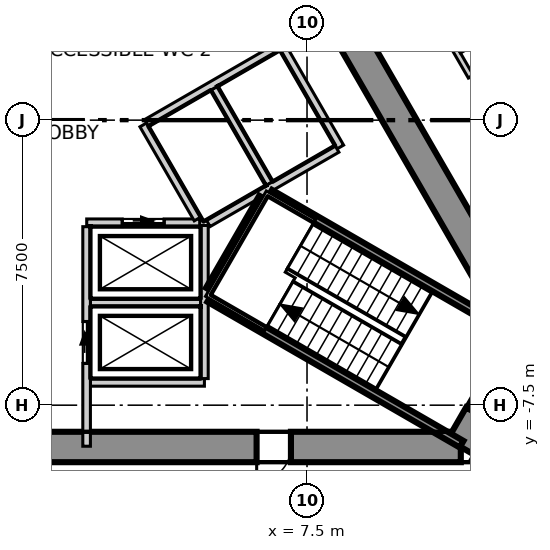
"""IFC4 building model, lengths in metres.
Left out: names, types, materials, properties, quantities, classifications, styles, units other than length and angle.
Written with IfcOpenShell. Run it as: python <this file> out.ifc"""

import sys

from ifc_helpers import new_model, si_unit, direction, frame, frame_2d, origin, place, context, subcontext, project, spatial, polyline, rectangle, outline, extrude, element, fill, save


model = new_model("IFC4")
c1 = context("Model", 3, precision=1e-05, world=origin(), true_north=direction((0.0, 1.0)))
c2 = subcontext(c1, "Body", "Model", "MODEL_VIEW")
j1 = project(units=[si_unit("LENGTHUNIT", "METRE"), si_unit("PLANEANGLEUNIT", "RADIAN")], contexts=[c1])
p1 = place(None, origin())
s1 = spatial("IfcSite", under=j1, at=p1, CompositionType="ELEMENT")
p2 = place(p1, origin())
s2 = spatial("IfcBuilding", under=s1, at=p2, CompositionType="ELEMENT")
p3 = place(p2, frame((0.0, 0.0, 164.3)))
s3 = spatial("IfcBuildingStorey", under=s2, at=p3, CompositionType="ELEMENT", Elevation=164.3)
p4 = place(p3, frame((-11.547, -8.6, -0.3), z_axis=(0.0, 0.0, 1.0), x_axis=(1.0, 0.0, 0.0)))
e1 = element("IfcWall", 1, at=p4, inside=s3, PredefinedType="SHEAR", context=c2, shape_type="SweptSolid", body=[
    extrude(outline(polyline([(-0.231, -0.4), (1.732, -0.4), (3.695, -0.4), (5.658, -0.4), (7.621, -0.4), (9.584, -0.4), (11.547, -0.4), (13.51, -0.4), (15.473, -0.4), (17.436, -0.4), (19.399, -0.4), (21.362, -0.4), (23.325, -0.4), (22.863, 0.4), (20.977, 0.4), (19.091, 0.4), (17.205, 0.4), (15.319, 0.4), (13.433, 0.4), (11.547, 0.4), (9.661, 0.4), (7.775, 0.4), (5.889, 0.4), (4.003, 0.4), (2.117, 0.4), (0.231, 0.4), (-0.231, -0.4)])), origin(), (0.0, 0.0, 1.0), 4.0),
])
p5 = place(p4, frame((3.34, 0.0, 0.3)))
e2 = element("IfcOpeningElement", 2, at=p5, cuts=e1, PredefinedType="OPENING", context=c2, shape_type="SweptSolid", body=[
    extrude(rectangle(XDim=0.9, YDim=2.1, at=frame_2d((0.45, 1.05))), frame((0.0, 0.41, 0.0), z_axis=(0.0, -1.0, 0.0), x_axis=(1.0, 0.0, 0.0)), (0.0, 0.0, 1.0), 0.82),
])
p6 = place(p4, frame((17.722, 0.0, 0.3)))
e3 = element("IfcOpeningElement", 3, at=p6, cuts=e1, PredefinedType="OPENING", context=c2, shape_type="SweptSolid", body=[
    extrude(rectangle(XDim=0.9, YDim=2.1, at=frame_2d((0.45, 1.05))), frame((0.0, 0.41, 0.0), z_axis=(0.0, -1.0, 0.0), x_axis=(1.0, 0.0, 0.0)), (0.0, 0.0, 1.0), 0.82),
])
p7 = place(p3, frame((11.547, -8.6, -0.3), z_axis=(0.0, 0.0, 1.0), x_axis=(0.49987182685, 0.866099391942, 0.0)))
e4 = element("IfcWall", 4, at=p7, inside=s3, PredefinedType="SHEAR", context=c2, shape_type="SweptSolid", body=[
    extrude(outline(polyline([(-0.231, -0.4), (1.674, -0.4), (3.579, -0.4), (3.118, 0.4), (1.674, 0.4), (0.231, 0.4), (-0.231, -0.4)])), origin(), (0.0, 0.0, 1.0), 4.0),
])
p8 = place(p7, frame((0.974, 0.0, 0.3)))
e5 = element("IfcOpeningElement", 5, at=p8, cuts=e4, PredefinedType="OPENING", context=c2, shape_type="SweptSolid", body=[
    extrude(rectangle(XDim=1.4, YDim=2.1, at=frame_2d((0.7, 1.05))), frame((0.0, 0.41, 0.0), z_axis=(0.0, -1.0, 0.0), x_axis=(1.0, 0.0, 0.0)), (0.0, 0.0, 1.0), 0.82),
])
p9 = place(p3, frame((13.221, -5.7, -0.3), z_axis=(0.0, 0.0, 1.0), x_axis=(-0.499995765644, 0.866027848477, 0.0)))
e6 = element("IfcWall", 6, at=p9, inside=s3, PredefinedType="SHEAR", context=c2, shape_type="SweptSolid", body=[
    extrude(outline(polyline([(-0.231, -0.4), (1.732, -0.4), (3.695, -0.4), (5.658, -0.4), (7.621, -0.4), (9.584, -0.4), (11.547, -0.4), (13.51, -0.4), (15.473, -0.4), (17.436, -0.4), (19.399, -0.4), (21.362, -0.4), (23.325, -0.4), (22.863, 0.4), (20.977, 0.4), (19.091, 0.4), (17.205, 0.4), (15.319, 0.4), (13.433, 0.4), (11.547, 0.4), (9.661, 0.4), (7.775, 0.4), (5.889, 0.4), (4.003, 0.4), (2.117, 0.4), (0.231, 0.4), (-0.231, -0.4)])), origin(), (0.0, 0.0, 1.0), 4.0),
])
p10 = place(p9, frame((10.647, 0.0, 0.3)))
e7 = element("IfcOpeningElement", 7, at=p10, cuts=e6, PredefinedType="OPENING", context=c2, shape_type="SweptSolid", body=[
    extrude(rectangle(XDim=1.8, YDim=2.1, at=frame_2d((0.9, 1.05))), frame((0.0, 0.41, 0.0), z_axis=(0.0, -1.0, 0.0), x_axis=(1.0, 0.0, 0.0)), (0.0, 0.0, 1.0), 0.82),
])
p11 = place(p9, frame((17.671, 0.0, 0.3)))
e8 = element("IfcOpeningElement", 8, at=p11, cuts=e6, PredefinedType="OPENING", context=c2, shape_type="SweptSolid", body=[
    extrude(rectangle(XDim=1.0, YDim=2.1, at=frame_2d((0.5, 1.05))), frame((0.0, 0.41, 0.0), z_axis=(0.0, -1.0, 0.0), x_axis=(1.0, 0.0, 0.0)), (0.0, 0.0, 1.0), 0.82),
])
p12 = place(p3, frame((30.204, -14.006, 0.0), z_axis=(0.0, 0.0, 1.0), x_axis=(-0.500008017777, 0.866020774669, 0.0)))
e9 = element("IfcWall", 9, at=p12, inside=s3, PredefinedType="ELEMENTEDWALL", context=c2, shape_type="SweptSolid", body=[
    extrude(rectangle(XDim=54.443, YDim=0.2, at=frame_2d((27.222, 0.0))), origin(), (0.0, 0.0, 1.0), 3.7),
])
p13 = place(p12, frame((2.094, 0.0, 0.9)))
e10 = element("IfcOpeningElement", 10, at=p13, cuts=e9, PredefinedType="OPENING", context=c2, shape_type="SweptSolid", body=[
    extrude(rectangle(XDim=4.9, YDim=2.5, at=frame_2d((2.45, 1.25))), frame((0.0, 0.11, 0.0), z_axis=(0.0, -1.0, 0.0), x_axis=(1.0, 0.0, 0.0)), (0.0, 0.0, 1.0), 0.22),
])
p14 = place(p12, frame((8.576, 0.0, 0.9)))
e11 = element("IfcOpeningElement", 11, at=p14, cuts=e9, PredefinedType="OPENING", context=c2, shape_type="SweptSolid", body=[
    extrude(rectangle(XDim=4.9, YDim=2.5, at=frame_2d((2.45, 1.25))), frame((0.0, 0.11, 0.0), z_axis=(0.0, -1.0, 0.0), x_axis=(1.0, 0.0, 0.0)), (0.0, 0.0, 1.0), 0.22),
])
p15 = place(p12, frame((15.058, 0.0, 0.9)))
e12 = element("IfcOpeningElement", 12, at=p15, cuts=e9, PredefinedType="OPENING", context=c2, shape_type="SweptSolid", body=[
    extrude(rectangle(XDim=4.9, YDim=2.5, at=frame_2d((2.45, 1.25))), frame((0.0, 0.11, 0.0), z_axis=(0.0, -1.0, 0.0), x_axis=(1.0, 0.0, 0.0)), (0.0, 0.0, 1.0), 0.22),
])
p16 = place(p12, frame((21.54, 0.0, 0.9)))
e13 = element("IfcOpeningElement", 13, at=p16, cuts=e9, PredefinedType="OPENING", context=c2, shape_type="SweptSolid", body=[
    extrude(rectangle(XDim=4.9, YDim=2.5, at=frame_2d((2.45, 1.25))), frame((0.0, 0.11, 0.0), z_axis=(0.0, -1.0, 0.0), x_axis=(1.0, 0.0, 0.0)), (0.0, 0.0, 1.0), 0.22),
])
p17 = place(p12, frame((28.023, 0.0, 0.9)))
e14 = element("IfcOpeningElement", 14, at=p17, cuts=e9, PredefinedType="OPENING", context=c2, shape_type="SweptSolid", body=[
    extrude(rectangle(XDim=4.9, YDim=2.5, at=frame_2d((2.45, 1.25))), frame((0.0, 0.11, 0.0), z_axis=(0.0, -1.0, 0.0), x_axis=(1.0, 0.0, 0.0)), (0.0, 0.0, 1.0), 0.22),
])
p18 = place(p12, frame((34.505, 0.0, 0.9)))
e15 = element("IfcOpeningElement", 15, at=p18, cuts=e9, PredefinedType="OPENING", context=c2, shape_type="SweptSolid", body=[
    extrude(rectangle(XDim=4.9, YDim=2.5, at=frame_2d((2.45, 1.25))), frame((0.0, 0.11, 0.0), z_axis=(0.0, -1.0, 0.0), x_axis=(1.0, 0.0, 0.0)), (0.0, 0.0, 1.0), 0.22),
])
p19 = place(p12, frame((40.987, 0.0, 0.9)))
e16 = element("IfcOpeningElement", 16, at=p19, cuts=e9, PredefinedType="OPENING", context=c2, shape_type="SweptSolid", body=[
    extrude(rectangle(XDim=4.9, YDim=2.5, at=frame_2d((2.45, 1.25))), frame((0.0, 0.11, 0.0), z_axis=(0.0, -1.0, 0.0), x_axis=(1.0, 0.0, 0.0)), (0.0, 0.0, 1.0), 0.22),
])
p20 = place(p12, frame((47.469, 0.0, 0.9)))
e17 = element("IfcOpeningElement", 17, at=p20, cuts=e9, PredefinedType="OPENING", context=c2, shape_type="SweptSolid", body=[
    extrude(rectangle(XDim=4.9, YDim=2.5, at=frame_2d((2.45, 1.25))), frame((0.0, 0.11, 0.0), z_axis=(0.0, -1.0, 0.0), x_axis=(1.0, 0.0, 0.0)), (0.0, 0.0, 1.0), 0.22),
])
p21 = place(p3, frame((9.804, 4.62, 0.0), z_axis=(0.0, 0.0, 1.0), x_axis=(0.500000173646, -0.86602530353, 0.0)))
e18 = element("IfcWall", 18, at=p21, inside=s3, PredefinedType="PARTITIONING", context=c2, shape_type="SweptSolid", body=[
    extrude(rectangle(XDim=17.654, YDim=0.15, at=frame_2d((8.827, 0.0))), origin(), (0.0, 0.0, 1.0), 3.7),
])
p22 = place(p21, frame((14.354, 0.0, 0.0)))
e19 = element("IfcOpeningElement", 19, at=p22, cuts=e18, PredefinedType="OPENING", context=c2, shape_type="SweptSolid", body=[
    extrude(rectangle(XDim=1.1, YDim=2.1, at=frame_2d((0.55, 1.05))), frame((0.0, 0.085, 0.0), z_axis=(0.0, -1.0, 0.0), x_axis=(1.0, 0.0, 0.0)), (0.0, 0.0, 1.0), 0.17),
])
p23 = place(p21, frame((10.014, 0.0, 0.0)))
e20 = element("IfcOpeningElement", 20, at=p23, cuts=e18, PredefinedType="OPENING", context=c2, shape_type="SweptSolid", body=[
    extrude(rectangle(XDim=0.9, YDim=2.1, at=frame_2d((0.45, 1.05))), frame((0.0, 0.085, 0.0), z_axis=(0.0, -1.0, 0.0), x_axis=(1.0, 0.0, 0.0)), (0.0, 0.0, 1.0), 0.17),
])
p24 = place(p21, frame((6.814, 0.0, 0.0)))
e21 = element("IfcOpeningElement", 21, at=p24, cuts=e18, PredefinedType="OPENING", context=c2, shape_type="SweptSolid", body=[
    extrude(rectangle(XDim=0.9, YDim=2.1, at=frame_2d((0.45, 1.05))), frame((0.0, 0.085, 0.0), z_axis=(0.0, -1.0, 0.0), x_axis=(1.0, 0.0, 0.0)), (0.0, 0.0, 1.0), 0.17),
])
p25 = place(p21, frame((4.014, 0.0, 0.0)))
e22 = element("IfcOpeningElement", 22, at=p25, cuts=e18, PredefinedType="OPENING", context=c2, shape_type="SweptSolid", body=[
    extrude(rectangle(XDim=1.0, YDim=2.1, at=frame_2d((0.5, 1.05))), frame((0.0, 0.085, 0.0), z_axis=(0.0, -1.0, 0.0), x_axis=(1.0, 0.0, 0.0)), (0.0, 0.0, 1.0), 0.17),
])
p26 = place(p3, frame((11.5, 1.831, 0.0), z_axis=(0.0, 0.0, 1.0), x_axis=(0.866061862632, 0.499936846106, 0.0)))
e23 = element("IfcWall", 23, at=p26, inside=s3, PredefinedType="PARTITIONING", context=c2, shape_type="SweptSolid", body=[
    extrude(rectangle(XDim=3.45, YDim=0.15, at=frame_2d((1.725, 0.0))), origin(), (0.0, 0.0, 1.0), 3.7),
])
p27 = place(p3, frame((1.8, -6.9, 0.0), z_axis=(0.0, 0.0, 1.0), x_axis=(1.0, 0.0, 0.0)))
e24 = element("IfcWall", 24, at=p27, inside=s3, PredefinedType="SOLIDWALL", context=c2, shape_type="SweptSolid", body=[
    extrude(rectangle(XDim=3.0, YDim=0.2, at=frame_2d((1.5, 0.0))), origin(), (0.0, 0.0, 1.0), 3.7),
])
p28 = place(p3, frame((1.8, -4.8, 0.0), z_axis=(0.0, 0.0, 1.0), x_axis=(1.0, 0.0, 0.0)))
e25 = element("IfcWall", 25, at=p28, inside=s3, PredefinedType="SOLIDWALL", context=c2, shape_type="SweptSolid", body=[
    extrude(rectangle(XDim=2.9, YDim=0.2, at=frame_2d((1.45, 0.0))), origin(), (0.0, 0.0, 1.0), 3.7),
])
p29 = place(p3, frame((1.703, -2.7, 0.0), z_axis=(0.0, 0.0, 1.0), x_axis=(1.0, 0.0, 0.0)))
e26 = element("IfcWall", 26, at=p29, inside=s3, PredefinedType="SOLIDWALL", context=c2, shape_type="SweptSolid", body=[
    extrude(rectangle(XDim=2.973, YDim=0.2, at=frame_2d((1.487, 0.0))), origin(), (0.0, 0.0, 1.0), 3.7),
])
p30 = place(p29, frame((0.936, 0.0, 0.0)))
e27 = element("IfcOpeningElement", 27, at=p30, cuts=e26, PredefinedType="OPENING", context=c2, shape_type="SweptSolid", body=[
    extrude(rectangle(XDim=1.1, YDim=2.1, at=frame_2d((0.55, 1.05))), frame((0.0, 0.11, 0.0), z_axis=(0.0, -1.0, 0.0), x_axis=(1.0, 0.0, 0.0)), (0.0, 0.0, 1.0), 0.22),
])
p31 = place(p3, frame((3.19, -0.125, 0.0), z_axis=(0.0, 0.0, 1.0), x_axis=(0.499988658015, -0.866031951983, 0.0)))
e28 = element("IfcWall", 28, at=p31, inside=s3, PredefinedType="SOLIDWALL", context=c2, shape_type="SweptSolid", body=[
    extrude(rectangle(XDim=2.858, YDim=0.2, at=frame_2d((1.429, 0.0))), origin(), (0.0, 0.0, 1.0), 3.7),
])
p32 = place(p3, frame((1.7, -8.58, 0.0), z_axis=(0.0, 0.0, 1.0), x_axis=(0.0, 1.0, 0.0)))
e29 = element("IfcWall", 29, at=p32, inside=s3, PredefinedType="SOLIDWALL", context=c2, shape_type="SweptSolid", body=[
    extrude(rectangle(XDim=5.777, YDim=0.2, at=frame_2d((2.889, 0.0))), origin(), (0.0, 0.0, 1.0), 3.7),
])
p33 = place(p32, frame((2.18, 0.0, 0.0)))
e30 = element("IfcOpeningElement", 30, at=p33, cuts=e29, PredefinedType="OPENING", context=c2, shape_type="SweptSolid", body=[
    extrude(rectangle(XDim=1.1, YDim=2.1, at=frame_2d((0.55, 1.05))), frame((0.0, 0.11, 0.0), z_axis=(0.0, -1.0, 0.0), x_axis=(1.0, 0.0, 0.0)), (0.0, 0.0, 1.0), 0.22),
])
p34 = place(p3, frame((4.8, -6.8, 0.0), z_axis=(0.0, 0.0, 1.0), x_axis=(0.0, 1.0, 0.0)))
e31 = element("IfcWall", 31, at=p34, inside=s3, PredefinedType="SOLIDWALL", context=c2, shape_type="SweptSolid", body=[
    extrude(rectangle(XDim=4.029, YDim=0.2, at=frame_2d((2.015, 0.0))), origin(), (0.0, 0.0, 1.0), 3.7),
])
p35 = place(p3, frame((6.876, 1.891, 0.0), z_axis=(0.0, 0.0, 1.0), x_axis=(0.499990139034, -0.866031096941, 0.0)))
e32 = element("IfcWall", 32, at=p35, inside=s3, PredefinedType="SOLIDWALL", context=c2, shape_type="SweptSolid", body=[
    extrude(rectangle(XDim=3.0, YDim=0.2, at=frame_2d((1.5, 0.0))), origin(), (0.0, 0.0, 1.0), 3.7),
])
p36 = place(p3, frame((5.057, 0.841, 0.0), z_axis=(0.0, 0.0, 1.0), x_axis=(0.50012328804, -0.865954211699, 0.0)))
e33 = element("IfcWall", 33, at=p36, inside=s3, PredefinedType="SOLIDWALL", context=c2, shape_type="SweptSolid", body=[
    extrude(rectangle(XDim=2.9, YDim=0.2, at=frame_2d((1.45, 0.0))), origin(), (0.0, 0.0, 1.0), 3.7),
])
p37 = place(p3, frame((3.278, -0.071, 0.0), z_axis=(0.0, 0.0, 1.0), x_axis=(0.865929348003, 0.5001663366, 0.0)))
e34 = element("IfcWall", 34, at=p37, inside=s3, PredefinedType="SOLIDWALL", context=c2, shape_type="SweptSolid", body=[
    extrude(rectangle(XDim=5.776, YDim=0.2, at=frame_2d((2.888, 0.0))), origin(), (0.0, 0.0, 1.0), 3.7),
])
p38 = place(p3, frame((4.9, -2.714, 0.0), z_axis=(0.0, 0.0, 1.0), x_axis=(0.865992350556, 0.500057245502, 0.0)))
e35 = element("IfcWall", 35, at=p38, inside=s3, PredefinedType="SOLIDWALL", context=c2, shape_type="SweptSolid", body=[
    extrude(rectangle(XDim=3.914, YDim=0.2, at=frame_2d((1.957, 0.0))), origin(), (0.0, 0.0, 1.0), 3.7),
])
p39 = place(p3, frame((4.929, -4.693, 0.0), z_axis=(0.0, 0.0, 1.0), x_axis=(0.866005769735, -0.50003400563, 0.0)))
e36 = element("IfcWall", 36, at=p39, inside=s3, PredefinedType="SOLIDWALL", context=c2, shape_type="SweptSolid", body=[
    extrude(rectangle(XDim=7.665, YDim=0.2, at=frame_2d((3.833, 0.0))), origin(), (0.0, 0.0, 1.0), 3.7),
])
p40 = place(p3, frame((4.929, -4.462, 0.0), z_axis=(0.0, 0.0, 1.0), x_axis=(0.500200581029, 0.865909567298, 0.0)))
e37 = element("IfcWall", 37, at=p40, inside=s3, PredefinedType="SOLIDWALL", context=c2, shape_type="SweptSolid", body=[
    extrude(rectangle(XDim=2.799, YDim=0.2, at=frame_2d((1.399, 0.0))), origin(), (0.0, 0.0, 1.0), 3.7),
])
p41 = place(p3, frame((6.529, -1.922, 0.0), z_axis=(0.0, 0.0, 1.0), x_axis=(0.866060938598, -0.499938446846, 0.0)))
e38 = element("IfcWall", 38, at=p41, inside=s3, PredefinedType="SOLIDWALL", context=c2, shape_type="SweptSolid", body=[
    extrude(rectangle(XDim=7.665, YDim=0.2, at=frame_2d((3.832, 0.0))), origin(), (0.0, 0.0, 1.0), 3.7),
])
p42 = place(p30, origin())
e39 = element("IfcDoor", 39, at=p42, inside=s3, OperationType="SLIDING_TO_LEFT", PredefinedType="DOOR", context=c2, shape_type="SweptSolid", body=[
    extrude(rectangle(XDim=1.1, YDim=2.1, at=frame_2d((0.55, 1.05))), frame((0.0, 0.025, 0.0), z_axis=(0.0, -1.0, 0.0), x_axis=(1.0, 0.0, 0.0)), (0.0, 0.0, 1.0), 0.05),
])
fill(e27, e39)
p43 = place(p33, origin())
e40 = element("IfcDoor", 40, at=p43, inside=s3, OperationType="SLIDING_TO_LEFT", PredefinedType="DOOR", context=c2, shape_type="SweptSolid", body=[
    extrude(rectangle(XDim=1.1, YDim=2.1, at=frame_2d((0.55, 1.05))), frame((0.0, 0.025, 0.0), z_axis=(0.0, -1.0, 0.0), x_axis=(1.0, 0.0, 0.0)), (0.0, 0.0, 1.0), 0.05),
])
fill(e30, e40)
p44 = place(p25, origin())
e41 = element("IfcDoor", 41, at=p44, inside=s3, OperationType="SINGLE_SWING_LEFT", PredefinedType="DOOR", context=c2, shape_type="SweptSolid", body=[
    extrude(rectangle(XDim=1.0, YDim=2.1, at=frame_2d((0.5, 1.05))), frame((0.0, 0.025, 0.0), z_axis=(0.0, -1.0, 0.0), x_axis=(1.0, 0.0, 0.0)), (0.0, 0.0, 1.0), 0.05),
])
fill(e22, e41)
p45 = place(p6, origin())
e42 = element("IfcDoor", 42, at=p45, inside=s3, OperationType="SINGLE_SWING_LEFT", PredefinedType="DOOR", context=c2, shape_type="SweptSolid", body=[
    extrude(rectangle(XDim=0.9, YDim=2.1, at=frame_2d((0.45, 1.05))), frame((0.0, 0.025, 0.0), z_axis=(0.0, -1.0, 0.0), x_axis=(1.0, 0.0, 0.0)), (0.0, 0.0, 1.0), 0.05),
])
fill(e3, e42)
save(model, sys.argv[1])
